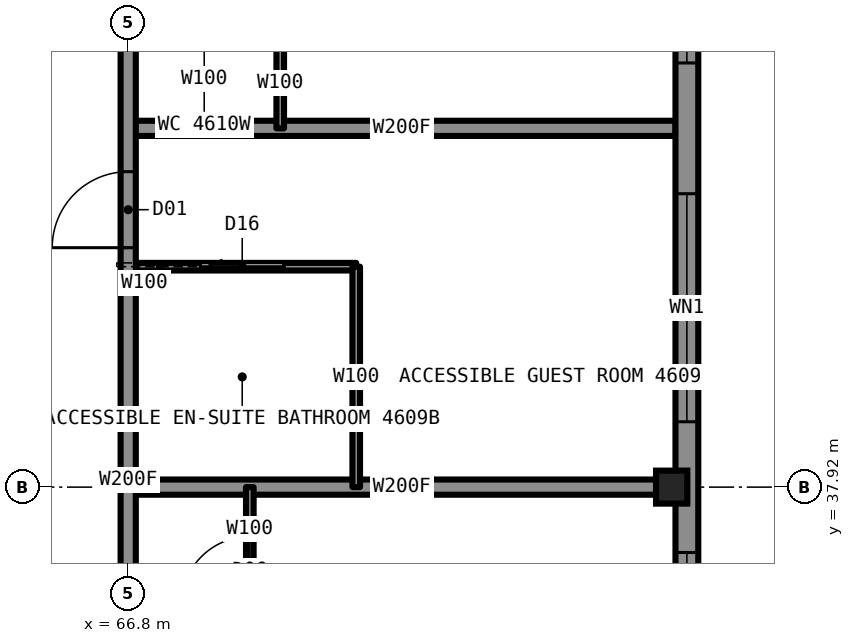
"""IFC4 building model, lengths in metres.
Left out: names, types, materials, properties, quantities, classifications, styles, units other than length and angle.
Written with IfcOpenShell. Run it as: python <this file> out.ifc"""

import sys

from ifc_helpers import new_model, si_unit, direction, frame, frame_2d, origin, origin_2d, place, context, subcontext, project, spatial, rectangle, i_section, extrude, element, fill, save


model = new_model("IFC4")
c1 = context("Model", 3, precision=1e-05, world=origin(), true_north=direction((0.0, 1.0)))
c2 = subcontext(c1, "Body", "Model", "MODEL_VIEW")
j1 = project(units=[si_unit("LENGTHUNIT", "METRE"), si_unit("PLANEANGLEUNIT", "RADIAN")], contexts=[c1])
p1 = place(None, origin())
s1 = spatial("IfcSite", under=j1, at=p1, CompositionType="ELEMENT")
p2 = place(p1, origin())
s2 = spatial("IfcBuilding", under=s1, at=p2, CompositionType="ELEMENT")
p3 = place(p2, frame((0.0, 0.0, 172.3)))
s3 = spatial("IfcBuildingStorey", under=s2, at=p3, CompositionType="ELEMENT", Elevation=172.3)
p4 = place(p3, frame((73.95, 37.92, 0.0), z_axis=(0.0, 0.0, 1.0), x_axis=(1.0, 0.0, 0.0)))
e1 = element("IfcColumn", 1, at=p4, inside=s3, PredefinedType="COLUMN", context=c2, shape_type="SweptSolid", body=[
    extrude(i_section(OverallWidth=0.411, OverallDepth=0.434, WebThickness=0.036, FlangeThickness=0.057, at=origin_2d()), origin(), (0.0, 0.0, 1.0), 3.5),
])
p5 = place(p3, frame((66.8, 42.64, 0.0), z_axis=(0.0, 0.0, 1.0), x_axis=(1.0, 0.0, 0.0)))
e2 = element("IfcWall", 2, at=p5, inside=s3, PredefinedType="PARTITIONING", context=c2, shape_type="SweptSolid", body=[
    extrude(rectangle(XDim=7.2, YDim=0.2, at=frame_2d((3.6, 0.0))), origin(), (0.0, 0.0, 1.0), 2.73),
])
p6 = place(p3, frame((66.8, 40.82, 0.0), z_axis=(0.0, 0.0, 1.0), x_axis=(1.0, 0.0, 0.0)))
e3 = element("IfcWall", 3, at=p6, inside=s3, PredefinedType="PARTITIONING", context=c2, shape_type="SweptSolid", body=[
    extrude(rectangle(XDim=3.0, YDim=0.1, at=frame_2d((1.5, 0.0))), origin(), (0.0, 0.0, 1.0), 3.33),
])
p7 = place(p6, frame((0.95, 0.0, 0.0)))
e4 = element("IfcOpeningElement", 4, at=p7, cuts=e3, PredefinedType="OPENING", context=c2, shape_type="SweptSolid", body=[
    extrude(rectangle(XDim=1.1, YDim=2.1, at=frame_2d((0.55, 1.05))), frame((0.0, 0.06, 0.0), z_axis=(0.0, -1.0, 0.0), x_axis=(1.0, 0.0, 0.0)), (0.0, 0.0, 1.0), 0.12),
])
p8 = place(p3, frame((66.8, 37.92, 0.0), z_axis=(0.0, 0.0, 1.0), x_axis=(1.0, 0.0, 0.0)))
e5 = element("IfcWall", 5, at=p8, inside=s3, PredefinedType="PARTITIONING", context=c2, shape_type="SweptSolid", body=[
    extrude(rectangle(XDim=7.2, YDim=0.2, at=frame_2d((3.6, 0.0))), origin(), (0.0, 0.0, 1.0), 2.573),
])
p9 = place(p3, frame((66.8, 33.2, 0.0), z_axis=(0.0, 0.0, 1.0), x_axis=(0.0, 1.0, 0.0)))
e6 = element("IfcWall", 6, at=p9, inside=s3, PredefinedType="PARTITIONING", context=c2, shape_type="SweptSolid", body=[
    extrude(rectangle(XDim=23.58, YDim=0.2, at=frame_2d((11.79, 0.0))), origin(), (0.0, 0.0, 1.0), 3.33),
])
p10 = place(p9, frame((7.87, 0.0, 0.0)))
e7 = element("IfcOpeningElement", 7, at=p10, cuts=e6, PredefinedType="OPENING", context=c2, shape_type="SweptSolid", body=[
    extrude(rectangle(XDim=1.0, YDim=2.2, at=frame_2d((0.5, 1.1))), frame((0.0, 0.11, 0.0), z_axis=(0.0, -1.0, 0.0), x_axis=(1.0, 0.0, 0.0)), (0.0, 0.0, 1.0), 0.22),
])
p11 = place(p9, frame((10.9, 0.0, 0.0)))
e8 = element("IfcOpeningElement", 8, at=p11, cuts=e6, PredefinedType="OPENING", context=c2, shape_type="SweptSolid", body=[
    extrude(rectangle(XDim=1.0, YDim=2.2, at=frame_2d((0.5, 1.1))), frame((0.0, 0.11, 0.0), z_axis=(0.0, -1.0, 0.0), x_axis=(1.0, 0.0, 0.0)), (0.0, 0.0, 1.0), 0.22),
])
p12 = place(p9, frame((16.42, 0.0, 0.0)))
e9 = element("IfcOpeningElement", 9, at=p12, cuts=e6, PredefinedType="OPENING", context=c2, shape_type="SweptSolid", body=[
    extrude(rectangle(XDim=1.0, YDim=2.2, at=frame_2d((0.5, 1.1))), frame((0.0, 0.11, 0.0), z_axis=(0.0, -1.0, 0.0), x_axis=(1.0, 0.0, 0.0)), (0.0, 0.0, 1.0), 0.22),
])
p13 = place(p9, frame((22.05, 0.0, 0.0)))
e10 = element("IfcOpeningElement", 10, at=p13, cuts=e6, PredefinedType="OPENING", context=c2, shape_type="SweptSolid", body=[
    extrude(rectangle(XDim=1.1, YDim=2.2, at=frame_2d((0.55, 1.1))), frame((0.0, 0.11, 0.0), z_axis=(0.0, -1.0, 0.0), x_axis=(1.0, 0.0, 0.0)), (0.0, 0.0, 1.0), 0.22),
])
p14 = place(p9, frame((0.65, 0.0, 0.0)))
e11 = element("IfcOpeningElement", 11, at=p14, cuts=e6, PredefinedType="OPENING", context=c2, shape_type="SweptSolid", body=[
    extrude(rectangle(XDim=1.1, YDim=2.2, at=frame_2d((0.55, 1.1))), frame((0.0, 0.11, 0.0), z_axis=(0.0, -1.0, 0.0), x_axis=(1.0, 0.0, 0.0)), (0.0, 0.0, 1.0), 0.22),
])
p15 = place(p3, frame((68.4, 35.72, 0.0), z_axis=(0.0, 0.0, 1.0), x_axis=(0.0, 1.0, 0.0)))
e12 = element("IfcWall", 12, at=p15, inside=s3, PredefinedType="PARTITIONING", context=c2, shape_type="SweptSolid", body=[
    extrude(rectangle(XDim=2.2, YDim=0.1, at=frame_2d((1.1, 0.0))), origin(), (0.0, 0.0, 1.0), 3.33),
])
p16 = place(p15, frame((0.65, 0.0, 0.0)))
e13 = element("IfcOpeningElement", 13, at=p16, cuts=e12, PredefinedType="OPENING", context=c2, shape_type="SweptSolid", body=[
    extrude(rectangle(XDim=0.9, YDim=2.1, at=frame_2d((0.45, 1.05))), frame((0.0, 0.06, 0.0), z_axis=(0.0, -1.0, 0.0), x_axis=(1.0, 0.0, 0.0)), (0.0, 0.0, 1.0), 0.12),
])
p17 = place(p3, frame((68.8, 42.64, 0.0), z_axis=(0.0, 0.0, 1.0), x_axis=(0.0, 1.0, 0.0)))
e14 = element("IfcWall", 14, at=p17, inside=s3, PredefinedType="PARTITIONING", context=c2, shape_type="SweptSolid", body=[
    extrude(rectangle(XDim=1.2, YDim=0.1, at=frame_2d((0.6, 0.0))), origin(), (0.0, 0.0, 1.0), 3.33),
])
p18 = place(p3, frame((69.8, 37.92, 0.0), z_axis=(0.0, 0.0, 1.0), x_axis=(0.0, 1.0, 0.0)))
e15 = element("IfcWall", 15, at=p18, inside=s3, PredefinedType="PARTITIONING", context=c2, shape_type="SweptSolid", body=[
    extrude(rectangle(XDim=2.9, YDim=0.1, at=frame_2d((1.45, 0.0))), origin(), (0.0, 0.0, 1.0), 3.33),
])
p19 = place(p3, frame((74.15, 31.2, 0.0), z_axis=(0.0, 0.0, 1.0), x_axis=(0.0, 1.0, 0.0)))
e16 = element("IfcWall", 16, at=p19, inside=s3, PredefinedType="SOLIDWALL", context=c2, shape_type="SweptSolid", body=[
    extrude(rectangle(XDim=27.6, YDim=0.3, at=frame_2d((13.8, 0.0))), origin(), (0.0, 0.0, 1.0), 2.83),
])
p20 = place(p19, frame((3.46, 0.0, 0.3)))
e17 = element("IfcOpeningElement", 17, at=p20, cuts=e16, PredefinedType="OPENING", context=c2, shape_type="SweptSolid", body=[
    extrude(rectangle(XDim=2.4, YDim=2.0, at=frame_2d((1.2, 1.0))), frame((0.0, 0.16, 0.0), z_axis=(0.0, -1.0, 0.0), x_axis=(1.0, 0.0, 0.0)), (0.0, 0.0, 1.0), 0.32),
])
p21 = place(p19, frame((7.58, 0.0, 0.3)))
e18 = element("IfcOpeningElement", 18, at=p21, cuts=e16, PredefinedType="OPENING", context=c2, shape_type="SweptSolid", body=[
    extrude(rectangle(XDim=3.0, YDim=2.0, at=frame_2d((1.5, 1.0))), frame((0.0, 0.16, 0.0), z_axis=(0.0, -1.0, 0.0), x_axis=(1.0, 0.0, 0.0)), (0.0, 0.0, 1.0), 0.32),
])
p22 = place(p19, frame((12.3, 0.0, 0.3)))
e19 = element("IfcOpeningElement", 19, at=p22, cuts=e16, PredefinedType="OPENING", context=c2, shape_type="SweptSolid", body=[
    extrude(rectangle(XDim=3.0, YDim=2.0, at=frame_2d((1.5, 1.0))), frame((0.0, 0.16, 0.0), z_axis=(0.0, -1.0, 0.0), x_axis=(1.0, 0.0, 0.0)), (0.0, 0.0, 1.0), 0.32),
])
p23 = place(p19, frame((17.02, 0.0, 0.3)))
e20 = element("IfcOpeningElement", 20, at=p23, cuts=e16, PredefinedType="OPENING", context=c2, shape_type="SweptSolid", body=[
    extrude(rectangle(XDim=3.0, YDim=2.0, at=frame_2d((1.5, 1.0))), frame((0.0, 0.16, 0.0), z_axis=(0.0, -1.0, 0.0), x_axis=(1.0, 0.0, 0.0)), (0.0, 0.0, 1.0), 0.32),
])
p24 = place(p19, frame((21.74, 0.0, 0.3)))
e21 = element("IfcOpeningElement", 21, at=p24, cuts=e16, PredefinedType="OPENING", context=c2, shape_type="SweptSolid", body=[
    extrude(rectangle(XDim=2.4, YDim=2.0, at=frame_2d((1.2, 1.0))), frame((0.0, 0.16, 0.0), z_axis=(0.0, -1.0, 0.0), x_axis=(1.0, 0.0, 0.0)), (0.0, 0.0, 1.0), 0.32),
])
p25 = place(p19, frame((2.86, 0.0, 0.3)))
e22 = element("IfcOpeningElement", 22, at=p25, cuts=e16, PredefinedType="OPENING", context=c2, shape_type="SweptSolid", body=[
    extrude(rectangle(XDim=0.6, YDim=1.1, at=frame_2d((0.3, 0.55))), frame((0.0, 0.16, 0.0), z_axis=(0.0, -1.0, 0.0), x_axis=(1.0, 0.0, 0.0)), (0.0, 0.0, 1.0), 0.32),
])
p26 = place(p19, frame((24.14, 0.0, 0.3)))
e23 = element("IfcOpeningElement", 23, at=p26, cuts=e16, PredefinedType="OPENING", context=c2, shape_type="SweptSolid", body=[
    extrude(rectangle(XDim=0.6, YDim=1.1, at=frame_2d((0.3, 0.55))), frame((0.0, 0.16, 0.0), z_axis=(0.0, -1.0, 0.0), x_axis=(1.0, 0.0, 0.0)), (0.0, 0.0, 1.0), 0.32),
])
p27 = place(p10, origin())
e24 = element("IfcDoor", 24, at=p27, inside=s3, OperationType="SINGLE_SWING_LEFT", PredefinedType="DOOR", context=c2, shape_type="SweptSolid", body=[
    extrude(rectangle(XDim=1.0, YDim=2.2, at=frame_2d((0.5, 1.1))), frame((0.0, 0.025, 0.0), z_axis=(0.0, -1.0, 0.0), x_axis=(1.0, 0.0, 0.0)), (0.0, 0.0, 1.0), 0.05),
])
fill(e7, e24)
p28 = place(p7, origin())
e25 = element("IfcDoor", 25, at=p28, inside=s3, OperationType="SLIDING_TO_LEFT", PredefinedType="DOOR", context=c2, shape_type="SweptSolid", body=[
    extrude(rectangle(XDim=1.1, YDim=2.1, at=frame_2d((0.55, 1.05))), frame((0.0, 0.025, 0.0), z_axis=(0.0, -1.0, 0.0), x_axis=(1.0, 0.0, 0.0)), (0.0, 0.0, 1.0), 0.05),
])
fill(e4, e25)
p29 = place(p16, origin())
e26 = element("IfcDoor", 26, at=p29, inside=s3, OperationType="SINGLE_SWING_LEFT", PredefinedType="DOOR", context=c2, shape_type="SweptSolid", body=[
    extrude(rectangle(XDim=0.9, YDim=2.1, at=frame_2d((0.45, 1.05))), frame((0.0, 0.025, 0.0), z_axis=(0.0, -1.0, 0.0), x_axis=(1.0, 0.0, 0.0)), (0.0, 0.0, 1.0), 0.05),
])
fill(e13, e26)
p30 = place(p20, origin())
e27 = element("IfcWindow", 27, at=p30, inside=s3, PartitioningType="SINGLE_PANEL", PredefinedType="WINDOW", context=c2, shape_type="SweptSolid", body=[
    extrude(rectangle(XDim=2.4, YDim=2.0, at=frame_2d((1.2, 1.0))), frame((0.0, 0.13, 0.0), z_axis=(0.0, -1.0, 0.0), x_axis=(1.0, 0.0, 0.0)), (0.0, 0.0, 1.0), 0.06),
])
fill(e17, e27)
p31 = place(p21, origin())
e28 = element("IfcWindow", 28, at=p31, inside=s3, PartitioningType="SINGLE_PANEL", PredefinedType="WINDOW", context=c2, shape_type="SweptSolid", body=[
    extrude(rectangle(XDim=3.0, YDim=2.0, at=frame_2d((1.5, 1.0))), frame((0.0, 0.13, 0.0), z_axis=(0.0, -1.0, 0.0), x_axis=(1.0, 0.0, 0.0)), (0.0, 0.0, 1.0), 0.06),
])
fill(e18, e28)
p32 = place(p22, origin())
e29 = element("IfcWindow", 29, at=p32, inside=s3, PartitioningType="SINGLE_PANEL", PredefinedType="WINDOW", context=c2, shape_type="SweptSolid", body=[
    extrude(rectangle(XDim=3.0, YDim=2.0, at=frame_2d((1.5, 1.0))), frame((0.0, 0.13, 0.0), z_axis=(0.0, -1.0, 0.0), x_axis=(1.0, 0.0, 0.0)), (0.0, 0.0, 1.0), 0.06),
])
fill(e19, e29)
save(model, sys.argv[1])
